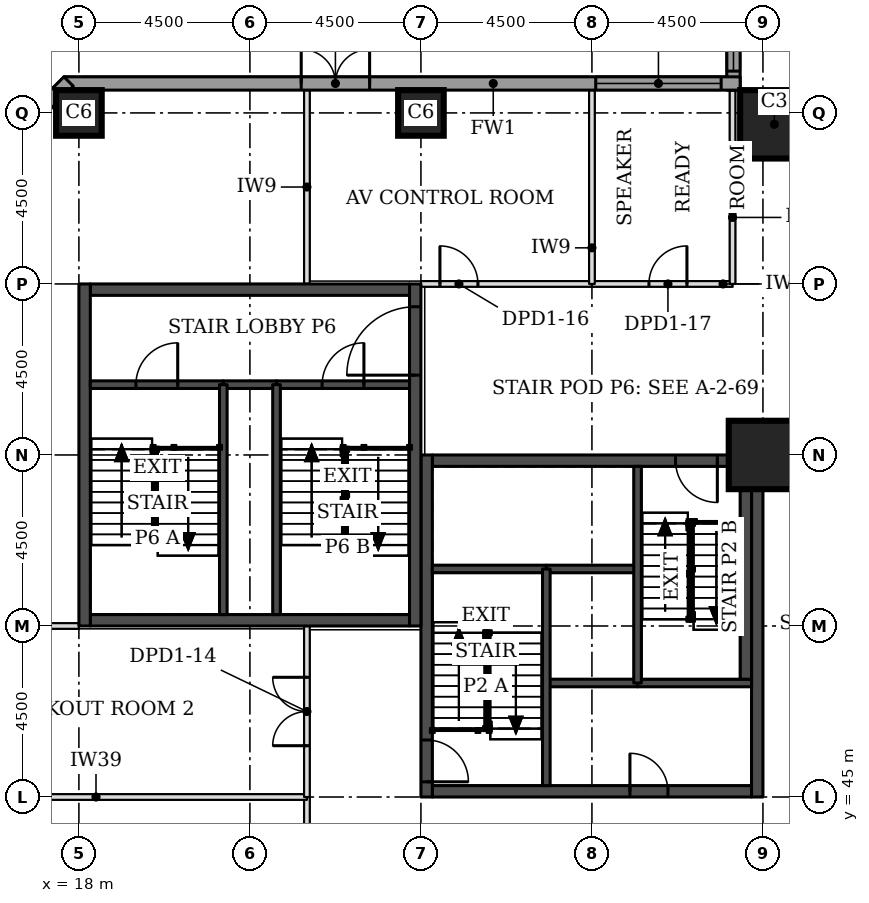
"""IFC4 building model, lengths in metres.
Left out: names, types, materials, properties, quantities, classifications, styles, units other than length and angle.
Written with IfcOpenShell. Run it as: python <this file> out.ifc"""

import sys

from ifc_helpers import new_model, si_unit, direction, frame, frame_2d, origin, origin_2d, place, context, subcontext, project, spatial, rectangle, extrude, element, fill, save


model = new_model("IFC4")
c1 = context("Model", 3, precision=1e-05, world=origin(), true_north=direction((0.0, 1.0)))
c2 = subcontext(c1, "Body", "Model", "MODEL_VIEW")
j1 = project(units=[si_unit("LENGTHUNIT", "METRE"), si_unit("PLANEANGLEUNIT", "RADIAN")], contexts=[c1])
p1 = place(None, origin())
s1 = spatial("IfcSite", under=j1, at=p1, CompositionType="ELEMENT")
p2 = place(p1, origin())
s2 = spatial("IfcBuilding", under=s1, at=p2, CompositionType="ELEMENT")
p3 = place(p2, frame((0.0, 0.0, 8.0)))
s3 = spatial("IfcBuildingStorey", under=s2, at=p3, CompositionType="ELEMENT", Elevation=8.0)
p4 = place(p3, frame((36.0, 54.0, 0.0), z_axis=(0.0, 0.0, 1.0), x_axis=(1.0, 0.0, 0.0)))
e1 = element("IfcColumn", 1, at=p4, inside=s3, PredefinedType="COLUMN", context=c2, shape_type="SweptSolid", body=[
    extrude(rectangle(XDim=1.8, YDim=1.8, at=origin_2d()), origin(), (0.0, 0.0, 1.0), 5.5),
])
for number, where, z_axis, x_axis in (
    (2, (18.0, 63.0, 0.0), (0.0, 0.0, 1.0), (1.0, 0.0, 0.0)),
    (3, (27.0, 63.0, 0.0), (0.0, 0.0, 1.0), (1.0, 0.0, 0.0)),
):
    element("IfcColumn", number, at=place(p3, frame(where, z_axis=z_axis, x_axis=x_axis)), inside=s3, PredefinedType="COLUMN", context=c2, shape_type="SweptSolid", body=[
        extrude(rectangle(XDim=1.2, YDim=1.2, at=origin_2d()), origin(), (0.0, 0.0, 1.0), 5.5),
    ])
p5 = place(p3, frame((36.3, 62.7, 0.0), z_axis=(0.0, 0.0, 1.0), x_axis=(1.0, 0.0, 0.0)))
e4 = element("IfcColumn", 4, at=p5, inside=s3, PredefinedType="COLUMN", context=c2, shape_type="SweptSolid", body=[
    extrude(rectangle(XDim=1.8, YDim=1.8, at=origin_2d()), origin(), (0.0, 0.0, 1.0), 5.5),
])
p6 = place(p3, frame((27.3, 45.15, 0.0), z_axis=(0.0, 0.0, 1.0), x_axis=(1.0, 0.0, 0.0)))
e5 = element("IfcWall", 5, at=p6, inside=s3, PredefinedType="SHEAR", context=c2, shape_type="SweptSolid", body=[
    extrude(rectangle(XDim=8.4, YDim=0.3, at=frame_2d((4.2, 0.0))), origin(), (0.0, 0.0, 1.0), 5.5),
])
p7 = place(p6, frame((5.2, 0.0, 0.0)))
e6 = element("IfcOpeningElement", 6, at=p7, cuts=e5, PredefinedType="OPENING", context=c2, shape_type="SweptSolid", body=[
    extrude(rectangle(XDim=1.0, YDim=2.1, at=frame_2d((0.5, 1.05))), frame((0.0, 0.16, 0.0), z_axis=(0.0, -1.0, 0.0), x_axis=(1.0, 0.0, 0.0)), (0.0, 0.0, 1.0), 0.32),
])
p8 = place(p3, frame((27.3, 53.85, 0.0), z_axis=(0.0, 0.0, 1.0), x_axis=(1.0, 0.0, 0.0)))
e7 = element("IfcWall", 7, at=p8, inside=s3, PredefinedType="SHEAR", context=c2, shape_type="SweptSolid", body=[
    extrude(rectangle(XDim=8.4, YDim=0.3, at=frame_2d((4.2, 0.0))), origin(), (0.0, 0.0, 1.0), 5.5),
])
p9 = place(p8, frame((6.4, 0.0, 0.0)))
e8 = element("IfcOpeningElement", 8, at=p9, cuts=e7, PredefinedType="OPENING", context=c2, shape_type="SweptSolid", body=[
    extrude(rectangle(XDim=1.1, YDim=2.1, at=frame_2d((0.55, 1.05))), frame((0.0, 0.16, 0.0), z_axis=(0.0, -1.0, 0.0), x_axis=(1.0, 0.0, 0.0)), (0.0, 0.0, 1.0), 0.32),
])
p10 = place(p3, frame((27.15, 45.0, 0.0), z_axis=(0.0, 0.0, 1.0), x_axis=(0.0, 1.0, 0.0)))
e9 = element("IfcWall", 9, at=p10, inside=s3, PredefinedType="SHEAR", context=c2, shape_type="SweptSolid", body=[
    extrude(rectangle(XDim=9.0, YDim=0.3, at=frame_2d((4.5, 0.0))), origin(), (0.0, 0.0, 1.0), 5.5),
])
p11 = place(p10, frame((0.4, 0.0, 0.0)))
e10 = element("IfcOpeningElement", 10, at=p11, cuts=e9, PredefinedType="OPENING", context=c2, shape_type="SweptSolid", body=[
    extrude(rectangle(XDim=1.1, YDim=2.1, at=frame_2d((0.55, 1.05))), frame((0.0, 0.16, 0.0), z_axis=(0.0, -1.0, 0.0), x_axis=(1.0, 0.0, 0.0)), (0.0, 0.0, 1.0), 0.32),
])
p12 = place(p3, frame((35.85, 45.0, 0.0), z_axis=(0.0, 0.0, 1.0), x_axis=(0.0, 1.0, 0.0)))
e11 = element("IfcWall", 11, at=p12, inside=s3, PredefinedType="SHEAR", context=c2, shape_type="SweptSolid", body=[
    extrude(rectangle(XDim=9.0, YDim=0.3, at=frame_2d((4.5, 0.0))), origin(), (0.0, 0.0, 1.0), 5.5),
])
for number, where, z_axis, x_axis in (
    (12, (18.3, 49.65, 0.0), (0.0, 0.0, 1.0), (1.0, 0.0, 0.0)),
    (13, (18.3, 58.35, 0.0), (0.0, 0.0, 1.0), (1.0, 0.0, 0.0)),
):
    element("IfcWall", number, at=place(p3, frame(where, z_axis=z_axis, x_axis=x_axis)), inside=s3, PredefinedType="SHEAR", context=c2, shape_type="SweptSolid", body=[
        extrude(rectangle(XDim=8.4, YDim=0.3, at=frame_2d((4.2, 0.0))), origin(), (0.0, 0.0, 1.0), 5.5),
    ])
p13 = place(p3, frame((18.15, 49.5, 0.0), z_axis=(0.0, 0.0, 1.0), x_axis=(0.0, 1.0, 0.0)))
e14 = element("IfcWall", 14, at=p13, inside=s3, PredefinedType="SHEAR", context=c2, shape_type="SweptSolid", body=[
    extrude(rectangle(XDim=9.0, YDim=0.3, at=frame_2d((4.5, 0.0))), origin(), (0.0, 0.0, 1.0), 5.5),
])
p14 = place(p3, frame((26.85, 49.5, 0.0), z_axis=(0.0, 0.0, 1.0), x_axis=(0.0, 1.0, 0.0)))
e15 = element("IfcWall", 15, at=p14, inside=s3, PredefinedType="SHEAR", context=c2, shape_type="SweptSolid", body=[
    extrude(rectangle(XDim=9.0, YDim=0.3, at=frame_2d((4.5, 0.0))), origin(), (0.0, 0.0, 1.0), 5.5),
])
p15 = place(p14, frame((6.6, 0.0, 0.0)))
e16 = element("IfcOpeningElement", 16, at=p15, cuts=e15, PredefinedType="OPENING", context=c2, shape_type="SweptSolid", body=[
    extrude(rectangle(XDim=1.8, YDim=2.1, at=frame_2d((0.9, 1.05))), frame((0.0, 0.16, 0.0), z_axis=(0.0, -1.0, 0.0), x_axis=(1.0, 0.0, 0.0)), (0.0, 0.0, 1.0), 0.32),
])
p16 = place(p3, frame((35.225, 76.894, 0.0), z_axis=(0.0, 0.0, 1.0), x_axis=(0.0, -1.0, 0.0)))
e17 = element("IfcWall", 17, at=p16, inside=s3, PredefinedType="STANDARD", context=c2, shape_type="SweptSolid", body=[
    extrude(rectangle(XDim=13.293, YDim=0.35, at=frame_2d((6.647, 0.0))), origin(), (0.0, 0.0, 1.0), 5.125),
])
p17 = place(p16, frame((9.493, 0.0, 0.9)))
e18 = element("IfcOpeningElement", 18, at=p17, cuts=e17, PredefinedType="OPENING", context=c2, shape_type="SweptSolid", body=[
    extrude(rectangle(XDim=3.3, YDim=3.4, at=frame_2d((1.65, 1.7))), frame((0.0, 0.185, 0.0), z_axis=(0.0, -1.0, 0.0), x_axis=(1.0, 0.0, 0.0)), (0.0, 0.0, 1.0), 0.37),
])
p18 = place(p3, frame((35.4, 63.775, 0.0), z_axis=(0.0, 0.0, 1.0), x_axis=(-1.0, 0.0, 0.0)))
e19 = element("IfcWall", 19, at=p18, inside=s3, PredefinedType="STANDARD", context=c2, shape_type="SweptSolid", body=[
    extrude(rectangle(XDim=17.793, YDim=0.35, at=frame_2d((8.897, 0.0))), origin(), (0.0, 0.0, 1.0), 5.125),
])
p19 = place(p18, frame((0.5, 0.0, 0.9)))
e20 = element("IfcOpeningElement", 20, at=p19, cuts=e19, PredefinedType="OPENING", context=c2, shape_type="SweptSolid", body=[
    extrude(rectangle(XDim=3.3, YDim=3.4, at=frame_2d((1.65, 1.7))), frame((0.0, 0.185, 0.0), z_axis=(0.0, -1.0, 0.0), x_axis=(1.0, 0.0, 0.0)), (0.0, 0.0, 1.0), 0.37),
])
p20 = place(p18, frame((9.75, 0.0, 0.0)))
e21 = element("IfcOpeningElement", 21, at=p20, cuts=e19, PredefinedType="OPENING", context=c2, shape_type="SweptSolid", body=[
    extrude(rectangle(XDim=1.8, YDim=2.4, at=frame_2d((0.9, 1.2))), frame((0.0, 0.185, 0.0), z_axis=(0.0, -1.0, 0.0), x_axis=(1.0, 0.0, 0.0)), (0.0, 0.0, 1.0), 0.37),
])
p21 = place(p3, frame((17.73, 63.826, 0.0), z_axis=(0.0, 0.0, 1.0), x_axis=(-0.707106781187, -0.707106781187, 0.0)))
e22 = element("IfcWall", 22, at=p21, inside=s3, PredefinedType="STANDARD", context=c2, shape_type="SweptSolid", body=[
    extrude(rectangle(XDim=7.151, YDim=0.35, at=frame_2d((3.576, 0.0))), origin(), (0.0, 0.0, 1.0), 5.125),
])
p22 = place(p21, frame((1.926, 0.0, 0.9)))
e23 = element("IfcOpeningElement", 23, at=p22, cuts=e22, PredefinedType="OPENING", context=c2, shape_type="SweptSolid", body=[
    extrude(rectangle(XDim=3.3, YDim=3.4, at=frame_2d((1.65, 1.7))), frame((0.0, 0.185, 0.0), z_axis=(0.0, -1.0, 0.0), x_axis=(1.0, 0.0, 0.0)), (0.0, 0.0, 1.0), 0.37),
])
p23 = place(p3, frame((24.0, 39.8, 0.0), z_axis=(0.0, 0.0, 1.0), x_axis=(0.0, 1.0, 0.0)))
e24 = element("IfcWall", 24, at=p23, inside=s3, PredefinedType="PARTITIONING", context=c2, shape_type="SweptSolid", body=[
    extrude(rectangle(XDim=5.2, YDim=0.15, at=frame_2d((2.6, 0.0))), origin(), (0.0, 0.0, 1.0), 5.15),
])
p24 = place(p23, frame((2.05, 0.0, 0.0)))
e25 = element("IfcOpeningElement", 25, at=p24, cuts=e24, PredefinedType="OPENING", context=c2, shape_type="SweptSolid", body=[
    extrude(rectangle(XDim=1.8, YDim=2.1, at=frame_2d((0.9, 1.05))), frame((0.0, 0.085, 0.0), z_axis=(0.0, -1.0, 0.0), x_axis=(1.0, 0.0, 0.0)), (0.0, 0.0, 1.0), 0.17),
])
p25 = place(p3, frame((12.9, 45.0, 0.0), z_axis=(0.0, 0.0, 1.0), x_axis=(1.0, 0.0, 0.0)))
e26 = element("IfcWall", 26, at=p25, inside=s3, PredefinedType="PARTITIONING", context=c2, shape_type="SweptSolid", body=[
    extrude(rectangle(XDim=11.1, YDim=0.15, at=frame_2d((5.55, 0.0))), origin(), (0.0, 0.0, 1.0), 4.15),
])
p26 = place(p3, frame((24.0, 45.0, 0.0), z_axis=(0.0, 0.0, 1.0), x_axis=(0.0, 1.0, 0.0)))
e27 = element("IfcWall", 27, at=p26, inside=s3, PredefinedType="PARTITIONING", context=c2, shape_type="SweptSolid", body=[
    extrude(rectangle(XDim=4.5, YDim=0.15, at=frame_2d((2.25, 0.0))), origin(), (0.0, 0.0, 1.0), 5.15),
])
p27 = place(p26, frame((1.35, 0.0, 0.0)))
e28 = element("IfcOpeningElement", 28, at=p27, cuts=e27, PredefinedType="OPENING", context=c2, shape_type="SweptSolid", body=[
    extrude(rectangle(XDim=1.8, YDim=2.1, at=frame_2d((0.9, 1.05))), frame((0.0, 0.085, 0.0), z_axis=(0.0, -1.0, 0.0), x_axis=(1.0, 0.0, 0.0)), (0.0, 0.0, 1.0), 0.17),
])
p28 = place(p3, frame((14.1, 49.5, 0.0), z_axis=(0.0, 0.0, 1.0), x_axis=(1.0, 0.0, 0.0)))
e29 = element("IfcWall", 29, at=p28, inside=s3, PredefinedType="PARTITIONING", context=c2, shape_type="SweptSolid", body=[
    extrude(rectangle(XDim=3.9, YDim=0.15, at=frame_2d((1.95, 0.0))), origin(), (0.0, 0.0, 1.0), 5.15),
])
p29 = place(p3, frame((27.0, 58.5, 0.0), z_axis=(0.0, 0.0, 1.0), x_axis=(1.0, 0.0, 0.0)))
e30 = element("IfcWall", 30, at=p29, inside=s3, PredefinedType="PARTITIONING", context=c2, shape_type="SweptSolid", body=[
    extrude(rectangle(XDim=4.5, YDim=0.15, at=frame_2d((2.25, 0.0))), origin(), (0.0, 0.0, 1.0), 4.15),
])
p30 = place(p29, frame((0.5, 0.0, 0.0)))
e31 = element("IfcOpeningElement", 31, at=p30, cuts=e30, PredefinedType="OPENING", context=c2, shape_type="SweptSolid", body=[
    extrude(rectangle(XDim=1.0, YDim=2.1, at=frame_2d((0.5, 1.05))), frame((0.0, 0.085, 0.0), z_axis=(0.0, -1.0, 0.0), x_axis=(1.0, 0.0, 0.0)), (0.0, 0.0, 1.0), 0.17),
])
p31 = place(p3, frame((24.0, 58.5, 0.0), z_axis=(0.0, 0.0, 1.0), x_axis=(0.0, 1.0, 0.0)))
e32 = element("IfcWall", 32, at=p31, inside=s3, PredefinedType="PARTITIONING", context=c2, shape_type="SweptSolid", body=[
    extrude(rectangle(XDim=5.1, YDim=0.15, at=frame_2d((2.55, 0.0))), origin(), (0.0, 0.0, 1.0), 5.15),
])
p32 = place(p3, frame((31.5, 58.5, 0.0), z_axis=(0.0, 0.0, 1.0), x_axis=(1.0, 0.0, 0.0)))
e33 = element("IfcWall", 33, at=p32, inside=s3, PredefinedType="PARTITIONING", context=c2, shape_type="SweptSolid", body=[
    extrude(rectangle(XDim=3.7, YDim=0.15, at=frame_2d((1.85, 0.0))), origin(), (0.0, 0.0, 1.0), 4.15),
])
p33 = place(p32, frame((1.5, 0.0, 0.0)))
e34 = element("IfcOpeningElement", 34, at=p33, cuts=e33, PredefinedType="OPENING", context=c2, shape_type="SweptSolid", body=[
    extrude(rectangle(XDim=1.0, YDim=2.1, at=frame_2d((0.5, 1.05))), frame((0.0, 0.085, 0.0), z_axis=(0.0, -1.0, 0.0), x_axis=(1.0, 0.0, 0.0)), (0.0, 0.0, 1.0), 0.17),
])
for number, where, z_axis, x_axis in (
    (35, (31.5, 58.5, 0.0), (0.0, 0.0, 1.0), (0.0, 1.0, 0.0)),
    (36, (35.2, 58.5, 0.0), (0.0, 0.0, 1.0), (0.0, 1.0, 0.0)),
):
    element("IfcWall", number, at=place(p3, frame(where, z_axis=z_axis, x_axis=x_axis)), inside=s3, PredefinedType="PARTITIONING", context=c2, shape_type="SweptSolid", body=[
        extrude(rectangle(XDim=5.1, YDim=0.15, at=frame_2d((2.55, 0.0))), origin(), (0.0, 0.0, 1.0), 5.15),
    ])
p34 = place(p3, frame((30.3, 48.0, 0.0), z_axis=(0.0, 0.0, 1.0), x_axis=(1.0, 0.0, 0.0)))
e37 = element("IfcWall", 37, at=p34, inside=s3, PredefinedType="SOLIDWALL", context=c2, shape_type="SweptSolid", body=[
    extrude(rectangle(XDim=2.4, YDim=0.2, at=frame_2d((1.2, 0.0))), origin(), (0.0, 0.0, 1.0), 5.15),
])
p35 = place(p3, frame((32.7, 48.0, 0.0), z_axis=(0.0, 0.0, 1.0), x_axis=(1.0, 0.0, 0.0)))
e38 = element("IfcWall", 38, at=p35, inside=s3, PredefinedType="SOLIDWALL", context=c2, shape_type="SweptSolid", body=[
    extrude(rectangle(XDim=3.0, YDim=0.2, at=frame_2d((1.5, 0.0))), origin(), (0.0, 0.0, 1.0), 5.15),
])
p36 = place(p3, frame((30.3, 51.0, 0.0), z_axis=(0.0, 0.0, 1.0), x_axis=(1.0, 0.0, 0.0)))
e39 = element("IfcWall", 39, at=p36, inside=s3, PredefinedType="SOLIDWALL", context=c2, shape_type="SweptSolid", body=[
    extrude(rectangle(XDim=2.4, YDim=0.2, at=frame_2d((1.2, 0.0))), origin(), (0.0, 0.0, 1.0), 5.5),
])
p37 = place(p3, frame((27.3, 51.0, 0.0), z_axis=(0.0, 0.0, 1.0), x_axis=(1.0, 0.0, 0.0)))
e40 = element("IfcWall", 40, at=p37, inside=s3, PredefinedType="SOLIDWALL", context=c2, shape_type="SweptSolid", body=[
    extrude(rectangle(XDim=3.0, YDim=0.2, at=frame_2d((1.5, 0.0))), origin(), (0.0, 0.0, 1.0), 5.15),
])
for number, where, z_axis, x_axis in (
    (41, (30.3, 45.3, 0.0), (0.0, 0.0, 1.0), (0.0, 1.0, 0.0)),
    (42, (32.7, 48.0, 0.0), (0.0, 0.0, 1.0), (0.0, 1.0, 0.0)),
):
    element("IfcWall", number, at=place(p3, frame(where, z_axis=z_axis, x_axis=x_axis)), inside=s3, PredefinedType="SOLIDWALL", context=c2, shape_type="SweptSolid", body=[
        extrude(rectangle(XDim=5.7, YDim=0.2, at=frame_2d((2.85, 0.0))), origin(), (0.0, 0.0, 1.0), 5.15),
    ])
p38 = place(p3, frame((21.8, 55.85, 0.0), z_axis=(0.0, 0.0, 1.0), x_axis=(1.0, 0.0, 0.0)))
e43 = element("IfcWall", 43, at=p38, inside=s3, PredefinedType="SOLIDWALL", context=c2, shape_type="SweptSolid", body=[
    extrude(rectangle(XDim=1.4, YDim=0.2, at=frame_2d((0.7, 0.0))), origin(), (0.0, 0.0, 1.0), 5.15),
])
p39 = place(p3, frame((18.3, 55.85, 0.0), z_axis=(0.0, 0.0, 1.0), x_axis=(1.0, 0.0, 0.0)))
e44 = element("IfcWall", 44, at=p39, inside=s3, PredefinedType="SOLIDWALL", context=c2, shape_type="SweptSolid", body=[
    extrude(rectangle(XDim=3.5, YDim=0.2, at=frame_2d((1.75, 0.0))), origin(), (0.0, 0.0, 1.0), 5.15),
])
p40 = place(p39, frame((1.2, 0.0, 0.0)))
e45 = element("IfcOpeningElement", 45, at=p40, cuts=e44, PredefinedType="OPENING", context=c2, shape_type="SweptSolid", body=[
    extrude(rectangle(XDim=1.1, YDim=2.1, at=frame_2d((0.55, 1.05))), frame((0.0, 0.11, 0.0), z_axis=(0.0, -1.0, 0.0), x_axis=(1.0, 0.0, 0.0)), (0.0, 0.0, 1.0), 0.22),
])
p41 = place(p3, frame((23.2, 55.85, 0.0), z_axis=(0.0, 0.0, 1.0), x_axis=(1.0, 0.0, 0.0)))
e46 = element("IfcWall", 46, at=p41, inside=s3, PredefinedType="SOLIDWALL", context=c2, shape_type="SweptSolid", body=[
    extrude(rectangle(XDim=3.5, YDim=0.2, at=frame_2d((1.75, 0.0))), origin(), (0.0, 0.0, 1.0), 5.15),
])
p42 = place(p41, frame((1.2, 0.0, 0.0)))
e47 = element("IfcOpeningElement", 47, at=p42, cuts=e46, PredefinedType="OPENING", context=c2, shape_type="SweptSolid", body=[
    extrude(rectangle(XDim=1.1, YDim=2.1, at=frame_2d((0.55, 1.05))), frame((0.0, 0.11, 0.0), z_axis=(0.0, -1.0, 0.0), x_axis=(1.0, 0.0, 0.0)), (0.0, 0.0, 1.0), 0.22),
])
for number, where, z_axis, x_axis in (
    (48, (21.8, 49.8, 0.0), (0.0, 0.0, 1.0), (0.0, 1.0, 0.0)),
    (49, (23.2, 49.8, 0.0), (0.0, 0.0, 1.0), (0.0, 1.0, 0.0)),
):
    element("IfcWall", number, at=place(p3, frame(where, z_axis=z_axis, x_axis=x_axis)), inside=s3, PredefinedType="SOLIDWALL", context=c2, shape_type="SweptSolid", body=[
        extrude(rectangle(XDim=6.05, YDim=0.2, at=frame_2d((3.025, 0.0))), origin(), (0.0, 0.0, 1.0), 5.15),
    ])
p43 = place(p3, frame((35.55, 48.1, 0.0), z_axis=(0.0, 0.0, 1.0), x_axis=(0.0, 1.0, 0.0)))
e50 = element("IfcWall", 50, at=p43, inside=s3, PredefinedType="SOLIDWALL", context=c2, shape_type="SweptSolid", body=[
    extrude(rectangle(XDim=5.6, YDim=0.3, at=frame_2d((2.8, 0.0))), origin(), (0.0, 0.0, 1.0), 5.15),
])
p44 = place(p17, origin())
e51 = element("IfcWindow", 51, at=p44, inside=s3, PartitioningType="SINGLE_PANEL", PredefinedType="WINDOW", context=c2, shape_type="SweptSolid", body=[
    extrude(rectangle(XDim=3.3, YDim=3.4, at=frame_2d((1.65, 1.7))), frame((0.0, 0.085, 0.0), z_axis=(0.0, -1.0, 0.0), x_axis=(1.0, 0.0, 0.0)), (0.0, 0.0, 1.0), 0.06),
])
fill(e18, e51)
p45 = place(p19, origin())
e52 = element("IfcWindow", 52, at=p45, inside=s3, PartitioningType="SINGLE_PANEL", PredefinedType="WINDOW", context=c2, shape_type="SweptSolid", body=[
    extrude(rectangle(XDim=3.3, YDim=3.4, at=frame_2d((1.65, 1.7))), frame((0.0, 0.085, 0.0), z_axis=(0.0, -1.0, 0.0), x_axis=(1.0, 0.0, 0.0)), (0.0, 0.0, 1.0), 0.06),
])
fill(e20, e52)
p46 = place(p20, frame((1.8, 0.0, 0.0), z_axis=(0.0, 0.0, 1.0), x_axis=(-1.0, 0.0, 0.0)))
e53 = element("IfcDoor", 53, at=p46, inside=s3, OperationType="DOUBLE_DOOR_SINGLE_SWING", PredefinedType="DOOR", context=c2, shape_type="SweptSolid", body=[
    extrude(rectangle(XDim=1.8, YDim=2.4, at=frame_2d((0.9, 1.2))), frame((0.0, -0.03, 0.0), z_axis=(0.0, -1.0, 0.0), x_axis=(1.0, 0.0, 0.0)), (0.0, 0.0, 1.0), 0.05),
])
fill(e21, e53)
p47 = place(p27, origin())
e54 = element("IfcDoor", 54, at=p47, inside=s3, OperationType="DOUBLE_DOOR_SINGLE_SWING", PredefinedType="DOOR", context=c2, shape_type="SweptSolid", body=[
    extrude(rectangle(XDim=1.8, YDim=2.1, at=frame_2d((0.9, 1.05))), frame((0.0, 0.025, 0.0), z_axis=(0.0, -1.0, 0.0), x_axis=(1.0, 0.0, 0.0)), (0.0, 0.0, 1.0), 0.05),
])
fill(e28, e54)
p48 = place(p30, origin())
e55 = element("IfcDoor", 55, at=p48, inside=s3, OperationType="SINGLE_SWING_LEFT", PredefinedType="DOOR", context=c2, shape_type="SweptSolid", body=[
    extrude(rectangle(XDim=1.0, YDim=2.1, at=frame_2d((0.5, 1.05))), frame((0.0, 0.025, 0.0), z_axis=(0.0, -1.0, 0.0), x_axis=(1.0, 0.0, 0.0)), (0.0, 0.0, 1.0), 0.05),
])
fill(e31, e55)
p49 = place(p33, origin())
e56 = element("IfcDoor", 56, at=p49, inside=s3, OperationType="SINGLE_SWING_RIGHT", PredefinedType="DOOR", context=c2, shape_type="SweptSolid", body=[
    extrude(rectangle(XDim=1.0, YDim=2.1, at=frame_2d((0.5, 1.05))), frame((0.0, 0.025, 0.0), z_axis=(0.0, -1.0, 0.0), x_axis=(1.0, 0.0, 0.0)), (0.0, 0.0, 1.0), 0.05),
])
fill(e34, e56)
p50 = place(p11, frame((1.1, 0.0, 0.0), z_axis=(0.0, 0.0, 1.0), x_axis=(-1.0, 0.0, 0.0)))
e57 = element("IfcDoor", 57, at=p50, inside=s3, OperationType="SINGLE_SWING_RIGHT", PredefinedType="DOOR", context=c2, shape_type="SweptSolid", body=[
    extrude(rectangle(XDim=1.1, YDim=2.1, at=frame_2d((0.55, 1.05))), frame((0.0, 0.025, 0.0), z_axis=(0.0, -1.0, 0.0), x_axis=(1.0, 0.0, 0.0)), (0.0, 0.0, 1.0), 0.05),
])
fill(e10, e57)
p51 = place(p9, frame((1.1, 0.0, 0.0), z_axis=(0.0, 0.0, 1.0), x_axis=(-1.0, 0.0, 0.0)))
e58 = element("IfcDoor", 58, at=p51, inside=s3, OperationType="SINGLE_SWING_LEFT", PredefinedType="DOOR", context=c2, shape_type="SweptSolid", body=[
    extrude(rectangle(XDim=1.1, YDim=2.1, at=frame_2d((0.55, 1.05))), frame((0.0, 0.025, 0.0), z_axis=(0.0, -1.0, 0.0), x_axis=(1.0, 0.0, 0.0)), (0.0, 0.0, 1.0), 0.05),
])
fill(e8, e58)
p52 = place(p7, origin())
e59 = element("IfcDoor", 59, at=p52, inside=s3, OperationType="SINGLE_SWING_LEFT", PredefinedType="DOOR", context=c2, shape_type="SweptSolid", body=[
    extrude(rectangle(XDim=1.0, YDim=2.1, at=frame_2d((0.5, 1.05))), frame((0.0, 0.025, 0.0), z_axis=(0.0, -1.0, 0.0), x_axis=(1.0, 0.0, 0.0)), (0.0, 0.0, 1.0), 0.05),
])
fill(e6, e59)
p53 = place(p40, origin())
e60 = element("IfcDoor", 60, at=p53, inside=s3, OperationType="SINGLE_SWING_RIGHT", PredefinedType="DOOR", context=c2, shape_type="SweptSolid", body=[
    extrude(rectangle(XDim=1.1, YDim=2.1, at=frame_2d((0.55, 1.05))), frame((0.0, 0.025, 0.0), z_axis=(0.0, -1.0, 0.0), x_axis=(1.0, 0.0, 0.0)), (0.0, 0.0, 1.0), 0.05),
])
fill(e45, e60)
p54 = place(p42, origin())
e61 = element("IfcDoor", 61, at=p54, inside=s3, OperationType="SINGLE_SWING_RIGHT", PredefinedType="DOOR", context=c2, shape_type="SweptSolid", body=[
    extrude(rectangle(XDim=1.1, YDim=2.1, at=frame_2d((0.55, 1.05))), frame((0.0, 0.025, 0.0), z_axis=(0.0, -1.0, 0.0), x_axis=(1.0, 0.0, 0.0)), (0.0, 0.0, 1.0), 0.05),
])
fill(e47, e61)
p55 = place(p15, origin())
e62 = element("IfcDoor", 62, at=p55, inside=s3, OperationType="SINGLE_SWING_LEFT", PredefinedType="DOOR", context=c2, shape_type="SweptSolid", body=[
    extrude(rectangle(XDim=1.8, YDim=2.1, at=frame_2d((0.9, 1.05))), frame((0.0, 0.025, 0.0), z_axis=(0.0, -1.0, 0.0), x_axis=(1.0, 0.0, 0.0)), (0.0, 0.0, 1.0), 0.05),
])
fill(e16, e62)
save(model, sys.argv[1])
